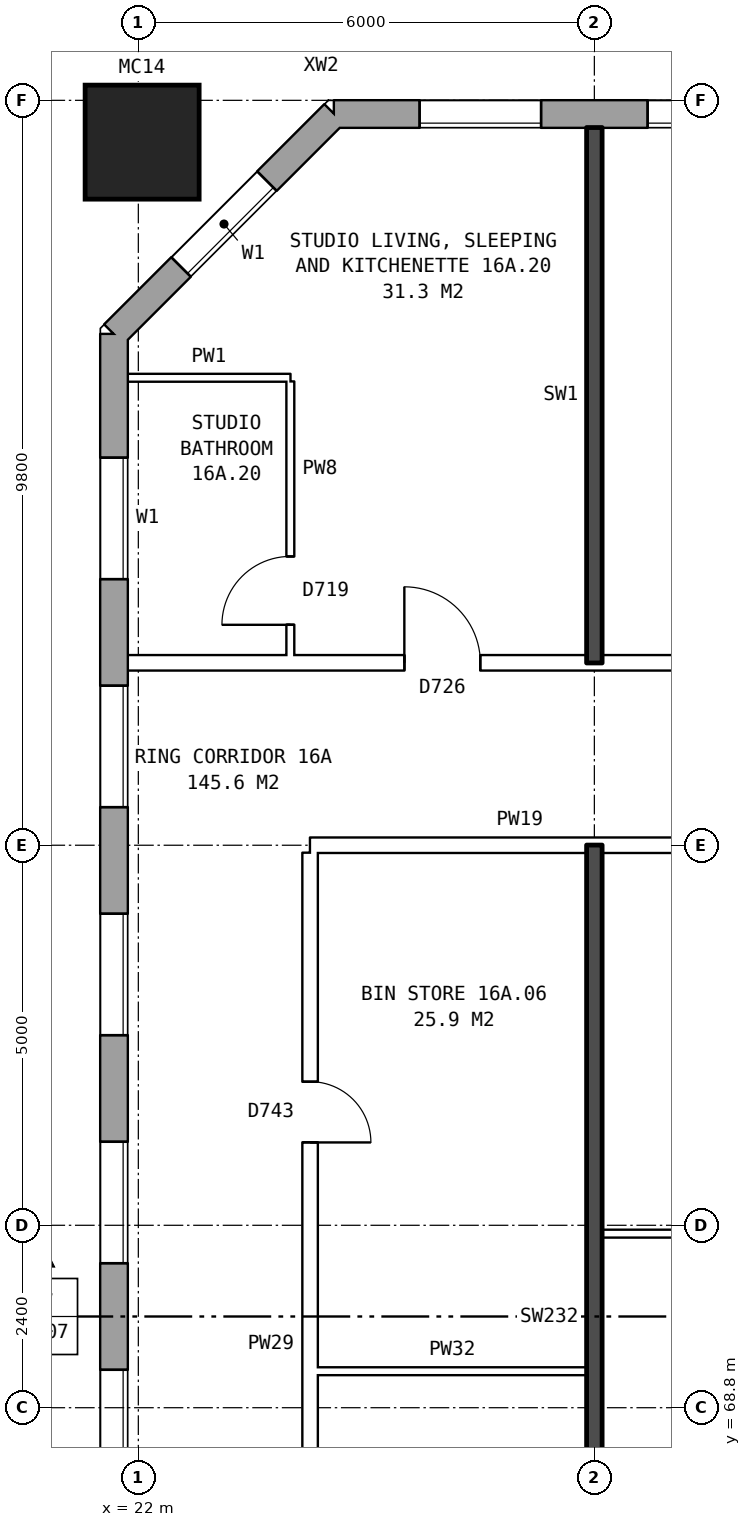
"""IFC4 building model, lengths in metres.
Left out: names, types, materials, properties, quantities, classifications, styles, units other than length and angle.
Written with IfcOpenShell. Run it as: python <this file> out.ifc"""

import sys

from ifc_helpers import new_model, si_unit, direction, frame, frame_2d, origin, origin_2d, place, context, subcontext, project, spatial, rectangle, hollow_rectangle, extrude, element, fill, save


model = new_model("IFC4")
c1 = context("Model", 3, precision=1e-05, world=origin(), true_north=direction((0.0, 1.0)))
c2 = subcontext(c1, "Body", "Model", "MODEL_VIEW")
j1 = project(units=[si_unit("LENGTHUNIT", "METRE"), si_unit("PLANEANGLEUNIT", "RADIAN")], contexts=[c1])
p1 = place(None, origin())
s1 = spatial("IfcSite", under=j1, at=p1, CompositionType="ELEMENT")
p2 = place(p1, origin())
s2 = spatial("IfcBuilding", under=s1, at=p2, CompositionType="ELEMENT")
p3 = place(p2, frame((0.0, 0.0, 59.8)))
s3 = spatial("IfcBuildingStorey", under=s2, at=p3, CompositionType="ELEMENT", Elevation=59.8)
p4 = place(p3, frame((22.05, 85.45, 0.0), z_axis=(0.0, 0.0, 1.0), x_axis=(1.0, 0.0, 0.0)))
e1 = element("IfcColumn", 1, at=p4, inside=s3, PredefinedType="COLUMN", context=c2, shape_type="SweptSolid", body=[
    extrude(hollow_rectangle(XDim=1.5, YDim=1.5, WallThickness=0.08, at=origin_2d()), origin(), (0.0, 0.0, 1.0), 3.1),
])
p5 = place(p3, frame((72.925, 85.82, 0.0), z_axis=(0.0, 0.0, 1.0), x_axis=(-1.0, 0.0, 0.0)))
e2 = element("IfcWall", 2, at=p5, inside=s3, PredefinedType="STANDARD", context=c2, shape_type="SweptSolid", body=[
    extrude(rectangle(XDim=48.351, YDim=0.36, at=frame_2d((24.175, 0.0))), origin(), (0.0, 0.0, 1.0), 2.85),
])
p6 = place(p5, frame((0.625, 0.0, 0.8)))
e3 = element("IfcOpeningElement", 3, at=p6, cuts=e2, PredefinedType="OPENING", context=c2, shape_type="SweptSolid", body=[
    extrude(rectangle(XDim=1.6, YDim=1.8, at=frame_2d((0.8, 0.9))), frame((0.0, 0.19, 0.0), z_axis=(0.0, -1.0, 0.0), x_axis=(1.0, 0.0, 0.0)), (0.0, 0.0, 1.0), 0.38),
])
p7 = place(p5, frame((3.625, 0.0, 0.8)))
e4 = element("IfcOpeningElement", 4, at=p7, cuts=e2, PredefinedType="OPENING", context=c2, shape_type="SweptSolid", body=[
    extrude(rectangle(XDim=1.6, YDim=1.8, at=frame_2d((0.8, 0.9))), frame((0.0, 0.19, 0.0), z_axis=(0.0, -1.0, 0.0), x_axis=(1.0, 0.0, 0.0)), (0.0, 0.0, 1.0), 0.38),
])
p8 = place(p5, frame((6.625, 0.0, 0.8)))
e5 = element("IfcOpeningElement", 5, at=p8, cuts=e2, PredefinedType="OPENING", context=c2, shape_type="SweptSolid", body=[
    extrude(rectangle(XDim=1.6, YDim=1.8, at=frame_2d((0.8, 0.9))), frame((0.0, 0.19, 0.0), z_axis=(0.0, -1.0, 0.0), x_axis=(1.0, 0.0, 0.0)), (0.0, 0.0, 1.0), 0.38),
])
p9 = place(p5, frame((9.625, 0.0, 0.8)))
e6 = element("IfcOpeningElement", 6, at=p9, cuts=e2, PredefinedType="OPENING", context=c2, shape_type="SweptSolid", body=[
    extrude(rectangle(XDim=1.6, YDim=1.8, at=frame_2d((0.8, 0.9))), frame((0.0, 0.19, 0.0), z_axis=(0.0, -1.0, 0.0), x_axis=(1.0, 0.0, 0.0)), (0.0, 0.0, 1.0), 0.38),
])
p10 = place(p5, frame((12.625, 0.0, 0.8)))
e7 = element("IfcOpeningElement", 7, at=p10, cuts=e2, PredefinedType="OPENING", context=c2, shape_type="SweptSolid", body=[
    extrude(rectangle(XDim=1.6, YDim=1.8, at=frame_2d((0.8, 0.9))), frame((0.0, 0.19, 0.0), z_axis=(0.0, -1.0, 0.0), x_axis=(1.0, 0.0, 0.0)), (0.0, 0.0, 1.0), 0.38),
])
p11 = place(p5, frame((15.625, 0.0, 0.8)))
e8 = element("IfcOpeningElement", 8, at=p11, cuts=e2, PredefinedType="OPENING", context=c2, shape_type="SweptSolid", body=[
    extrude(rectangle(XDim=1.6, YDim=1.8, at=frame_2d((0.8, 0.9))), frame((0.0, 0.19, 0.0), z_axis=(0.0, -1.0, 0.0), x_axis=(1.0, 0.0, 0.0)), (0.0, 0.0, 1.0), 0.38),
])
p12 = place(p5, frame((18.625, 0.0, 0.8)))
e9 = element("IfcOpeningElement", 9, at=p12, cuts=e2, PredefinedType="OPENING", context=c2, shape_type="SweptSolid", body=[
    extrude(rectangle(XDim=1.6, YDim=1.8, at=frame_2d((0.8, 0.9))), frame((0.0, 0.19, 0.0), z_axis=(0.0, -1.0, 0.0), x_axis=(1.0, 0.0, 0.0)), (0.0, 0.0, 1.0), 0.38),
])
p13 = place(p5, frame((21.125, 0.0, 1.65)))
e10 = element("IfcOpeningElement", 10, at=p13, cuts=e2, PredefinedType="OPENING", context=c2, shape_type="SweptSolid", body=[
    extrude(rectangle(XDim=0.8, YDim=0.9, at=frame_2d((0.4, 0.45))), frame((0.0, 0.19, 0.0), z_axis=(0.0, -1.0, 0.0), x_axis=(1.0, 0.0, 0.0)), (0.0, 0.0, 1.0), 0.38),
])
p14 = place(p5, frame((24.075, 0.0, 0.25)))
e11 = element("IfcOpeningElement", 11, at=p14, cuts=e2, PredefinedType="OPENING", context=c2, shape_type="SweptSolid", body=[
    extrude(rectangle(XDim=0.8, YDim=1.5, at=frame_2d((0.4, 0.75))), frame((0.0, 0.19, 0.0), z_axis=(0.0, -1.0, 0.0), x_axis=(1.0, 0.0, 0.0)), (0.0, 0.0, 1.0), 0.38),
])
p15 = place(p5, frame((27.625, 0.0, 0.8)))
e12 = element("IfcOpeningElement", 12, at=p15, cuts=e2, PredefinedType="OPENING", context=c2, shape_type="SweptSolid", body=[
    extrude(rectangle(XDim=1.6, YDim=1.8, at=frame_2d((0.8, 0.9))), frame((0.0, 0.19, 0.0), z_axis=(0.0, -1.0, 0.0), x_axis=(1.0, 0.0, 0.0)), (0.0, 0.0, 1.0), 0.38),
])
p16 = place(p5, frame((30.625, 0.0, 0.8)))
e13 = element("IfcOpeningElement", 13, at=p16, cuts=e2, PredefinedType="OPENING", context=c2, shape_type="SweptSolid", body=[
    extrude(rectangle(XDim=1.6, YDim=1.8, at=frame_2d((0.8, 0.9))), frame((0.0, 0.19, 0.0), z_axis=(0.0, -1.0, 0.0), x_axis=(1.0, 0.0, 0.0)), (0.0, 0.0, 1.0), 0.38),
])
p17 = place(p5, frame((33.625, 0.0, 0.8)))
e14 = element("IfcOpeningElement", 14, at=p17, cuts=e2, PredefinedType="OPENING", context=c2, shape_type="SweptSolid", body=[
    extrude(rectangle(XDim=1.6, YDim=1.8, at=frame_2d((0.8, 0.9))), frame((0.0, 0.19, 0.0), z_axis=(0.0, -1.0, 0.0), x_axis=(1.0, 0.0, 0.0)), (0.0, 0.0, 1.0), 0.38),
])
p18 = place(p5, frame((36.625, 0.0, 0.8)))
e15 = element("IfcOpeningElement", 15, at=p18, cuts=e2, PredefinedType="OPENING", context=c2, shape_type="SweptSolid", body=[
    extrude(rectangle(XDim=1.6, YDim=1.8, at=frame_2d((0.8, 0.9))), frame((0.0, 0.19, 0.0), z_axis=(0.0, -1.0, 0.0), x_axis=(1.0, 0.0, 0.0)), (0.0, 0.0, 1.0), 0.38),
])
p19 = place(p5, frame((39.625, 0.0, 0.8)))
e16 = element("IfcOpeningElement", 16, at=p19, cuts=e2, PredefinedType="OPENING", context=c2, shape_type="SweptSolid", body=[
    extrude(rectangle(XDim=1.6, YDim=1.8, at=frame_2d((0.8, 0.9))), frame((0.0, 0.19, 0.0), z_axis=(0.0, -1.0, 0.0), x_axis=(1.0, 0.0, 0.0)), (0.0, 0.0, 1.0), 0.38),
])
p20 = place(p5, frame((42.625, 0.0, 0.8)))
e17 = element("IfcOpeningElement", 17, at=p20, cuts=e2, PredefinedType="OPENING", context=c2, shape_type="SweptSolid", body=[
    extrude(rectangle(XDim=1.6, YDim=1.8, at=frame_2d((0.8, 0.9))), frame((0.0, 0.19, 0.0), z_axis=(0.0, -1.0, 0.0), x_axis=(1.0, 0.0, 0.0)), (0.0, 0.0, 1.0), 0.38),
])
p21 = place(p5, frame((45.625, 0.0, 0.8)))
e18 = element("IfcOpeningElement", 18, at=p21, cuts=e2, PredefinedType="OPENING", context=c2, shape_type="SweptSolid", body=[
    extrude(rectangle(XDim=1.6, YDim=1.8, at=frame_2d((0.8, 0.9))), frame((0.0, 0.19, 0.0), z_axis=(0.0, -1.0, 0.0), x_axis=(1.0, 0.0, 0.0)), (0.0, 0.0, 1.0), 0.38),
])
p22 = place(p5, frame((22.425, 0.0, 0.15)))
e19 = element("IfcOpeningElement", 19, at=p22, cuts=e2, PredefinedType="OPENING", context=c2, shape_type="SweptSolid", body=[
    extrude(rectangle(XDim=1.2, YDim=0.9, at=frame_2d((0.6, 0.45))), frame((0.0, 0.19, 0.0), z_axis=(0.0, -1.0, 0.0), x_axis=(1.0, 0.0, 0.0)), (0.0, 0.0, 1.0), 0.38),
])
p23 = place(p5, frame((25.175, 0.0, 0.25)))
e20 = element("IfcOpeningElement", 20, at=p23, cuts=e2, PredefinedType="OPENING", context=c2, shape_type="SweptSolid", body=[
    extrude(rectangle(XDim=0.6, YDim=0.9, at=frame_2d((0.3, 0.45))), frame((0.0, 0.19, 0.0), z_axis=(0.0, -1.0, 0.0), x_axis=(1.0, 0.0, 0.0)), (0.0, 0.0, 1.0), 0.38),
])
p24 = place(p3, frame((24.575, 85.82, 0.0), z_axis=(0.0, 0.0, 1.0), x_axis=(-0.707106781187, -0.707106781187, 0.0)))
e21 = element("IfcWall", 21, at=p24, inside=s3, PredefinedType="STANDARD", context=c2, shape_type="SweptSolid", body=[
    extrude(rectangle(XDim=4.094, YDim=0.36, at=frame_2d((2.047, 0.0))), origin(), (0.0, 0.0, 1.0), 2.85),
])
p25 = place(p24, frame((1.247, 0.0, 0.8)))
e22 = element("IfcOpeningElement", 22, at=p25, cuts=e21, PredefinedType="OPENING", context=c2, shape_type="SweptSolid", body=[
    extrude(rectangle(XDim=1.6, YDim=1.8, at=frame_2d((0.8, 0.9))), frame((0.0, 0.19, 0.0), z_axis=(0.0, -1.0, 0.0), x_axis=(1.0, 0.0, 0.0)), (0.0, 0.0, 1.0), 0.38),
])
p26 = place(p3, frame((21.68, 82.925, 0.0), z_axis=(0.0, 0.0, 1.0), x_axis=(0.0, -1.0, 0.0)))
e23 = element("IfcWall", 23, at=p26, inside=s3, PredefinedType="STANDARD", context=c2, shape_type="SweptSolid", body=[
    extrude(rectangle(XDim=25.851, YDim=0.36, at=frame_2d((12.925, 0.0))), origin(), (0.0, 0.0, 1.0), 2.85),
])
p27 = place(p26, frame((1.625, 0.0, 0.8)))
e24 = element("IfcOpeningElement", 24, at=p27, cuts=e23, PredefinedType="OPENING", context=c2, shape_type="SweptSolid", body=[
    extrude(rectangle(XDim=1.6, YDim=1.8, at=frame_2d((0.8, 0.9))), frame((0.0, 0.19, 0.0), z_axis=(0.0, -1.0, 0.0), x_axis=(1.0, 0.0, 0.0)), (0.0, 0.0, 1.0), 0.38),
])
p28 = place(p26, frame((4.625, 0.0, 0.8)))
e25 = element("IfcOpeningElement", 25, at=p28, cuts=e23, PredefinedType="OPENING", context=c2, shape_type="SweptSolid", body=[
    extrude(rectangle(XDim=1.6, YDim=1.8, at=frame_2d((0.8, 0.9))), frame((0.0, 0.19, 0.0), z_axis=(0.0, -1.0, 0.0), x_axis=(1.0, 0.0, 0.0)), (0.0, 0.0, 1.0), 0.38),
])
p29 = place(p26, frame((7.625, 0.0, 0.8)))
e26 = element("IfcOpeningElement", 26, at=p29, cuts=e23, PredefinedType="OPENING", context=c2, shape_type="SweptSolid", body=[
    extrude(rectangle(XDim=1.6, YDim=1.8, at=frame_2d((0.8, 0.9))), frame((0.0, 0.19, 0.0), z_axis=(0.0, -1.0, 0.0), x_axis=(1.0, 0.0, 0.0)), (0.0, 0.0, 1.0), 0.38),
])
p30 = place(p26, frame((10.625, 0.0, 0.8)))
e27 = element("IfcOpeningElement", 27, at=p30, cuts=e23, PredefinedType="OPENING", context=c2, shape_type="SweptSolid", body=[
    extrude(rectangle(XDim=1.6, YDim=1.8, at=frame_2d((0.8, 0.9))), frame((0.0, 0.19, 0.0), z_axis=(0.0, -1.0, 0.0), x_axis=(1.0, 0.0, 0.0)), (0.0, 0.0, 1.0), 0.38),
])
p31 = place(p26, frame((13.625, 0.0, 0.8)))
e28 = element("IfcOpeningElement", 28, at=p31, cuts=e23, PredefinedType="OPENING", context=c2, shape_type="SweptSolid", body=[
    extrude(rectangle(XDim=1.6, YDim=1.8, at=frame_2d((0.8, 0.9))), frame((0.0, 0.19, 0.0), z_axis=(0.0, -1.0, 0.0), x_axis=(1.0, 0.0, 0.0)), (0.0, 0.0, 1.0), 0.38),
])
p32 = place(p26, frame((16.625, 0.0, 0.8)))
e29 = element("IfcOpeningElement", 29, at=p32, cuts=e23, PredefinedType="OPENING", context=c2, shape_type="SweptSolid", body=[
    extrude(rectangle(XDim=1.6, YDim=1.8, at=frame_2d((0.8, 0.9))), frame((0.0, 0.19, 0.0), z_axis=(0.0, -1.0, 0.0), x_axis=(1.0, 0.0, 0.0)), (0.0, 0.0, 1.0), 0.38),
])
p33 = place(p26, frame((19.625, 0.0, 0.8)))
e30 = element("IfcOpeningElement", 30, at=p33, cuts=e23, PredefinedType="OPENING", context=c2, shape_type="SweptSolid", body=[
    extrude(rectangle(XDim=1.6, YDim=1.8, at=frame_2d((0.8, 0.9))), frame((0.0, 0.19, 0.0), z_axis=(0.0, -1.0, 0.0), x_axis=(1.0, 0.0, 0.0)), (0.0, 0.0, 1.0), 0.38),
])
p34 = place(p26, frame((22.625, 0.0, 0.8)))
e31 = element("IfcOpeningElement", 31, at=p34, cuts=e23, PredefinedType="OPENING", context=c2, shape_type="SweptSolid", body=[
    extrude(rectangle(XDim=1.6, YDim=1.8, at=frame_2d((0.8, 0.9))), frame((0.0, 0.19, 0.0), z_axis=(0.0, -1.0, 0.0), x_axis=(1.0, 0.0, 0.0)), (0.0, 0.0, 1.0), 0.38),
])
p35 = place(p3, frame((24.36, 69.28, 0.0), z_axis=(0.0, 0.0, 1.0), x_axis=(1.0, 0.0, 0.0)))
e32 = element("IfcWall", 32, at=p35, inside=s3, PredefinedType="PARTITIONING", context=c2, shape_type="SweptSolid", body=[
    extrude(rectangle(XDim=3.54, YDim=0.1, at=frame_2d((1.77, 0.0))), origin(), (0.0, 0.0, 1.0), 2.85),
])
p36 = place(p3, frame((28.1, 71.09, 0.0), z_axis=(0.0, 0.0, 1.0), x_axis=(1.0, 0.0, 0.0)))
e33 = element("IfcWall", 33, at=p36, inside=s3, PredefinedType="PARTITIONING", context=c2, shape_type="SweptSolid", body=[
    extrude(rectangle(XDim=4.26, YDim=0.1, at=frame_2d((2.13, 0.0))), origin(), (0.0, 0.0, 1.0), 2.85),
])
p37 = place(p3, frame((24.26, 76.2, 0.0), z_axis=(0.0, 0.0, 1.0), x_axis=(1.0, 0.0, 0.0)))
e34 = element("IfcWall", 34, at=p37, inside=s3, PredefinedType="PARTITIONING", context=c2, shape_type="SweptSolid", body=[
    extrude(rectangle(XDim=8.1, YDim=0.2, at=frame_2d((4.05, 0.0))), origin(), (0.0, 0.0, 1.0), 2.85),
])
p38 = place(p37, frame((5.52, 0.0, 0.0)))
e35 = element("IfcOpeningElement", 35, at=p38, cuts=e34, PredefinedType="OPENING", context=c2, shape_type="SweptSolid", body=[
    extrude(rectangle(XDim=0.8, YDim=2.1, at=frame_2d((0.4, 1.05))), frame((0.0, 0.11, 0.0), z_axis=(0.0, -1.0, 0.0), x_axis=(1.0, 0.0, 0.0)), (0.0, 0.0, 1.0), 0.22),
])
p39 = place(p3, frame((21.86, 78.6, 0.0), z_axis=(0.0, 0.0, 1.0), x_axis=(1.0, 0.0, 0.0)))
e36 = element("IfcWall", 36, at=p39, inside=s3, PredefinedType="PARTITIONING", context=c2, shape_type="SweptSolid", body=[
    extrude(rectangle(XDim=24.04, YDim=0.2, at=frame_2d((12.02, 0.0))), origin(), (0.0, 0.0, 1.0), 2.85),
])
p40 = place(p39, frame((20.59, 0.0, 0.0)))
e37 = element("IfcOpeningElement", 37, at=p40, cuts=e36, PredefinedType="OPENING", context=c2, shape_type="SweptSolid", body=[
    extrude(rectangle(XDim=1.0, YDim=2.1, at=frame_2d((0.5, 1.05))), frame((0.0, 0.11, 0.0), z_axis=(0.0, -1.0, 0.0), x_axis=(1.0, 0.0, 0.0)), (0.0, 0.0, 1.0), 0.22),
])
p41 = place(p39, frame((8.64, 0.0, 0.0)))
e38 = element("IfcOpeningElement", 38, at=p41, cuts=e36, PredefinedType="OPENING", context=c2, shape_type="SweptSolid", body=[
    extrude(rectangle(XDim=1.0, YDim=2.1, at=frame_2d((0.5, 1.05))), frame((0.0, 0.11, 0.0), z_axis=(0.0, -1.0, 0.0), x_axis=(1.0, 0.0, 0.0)), (0.0, 0.0, 1.0), 0.22),
])
p42 = place(p39, frame((3.64, 0.0, 0.0)))
e39 = element("IfcOpeningElement", 39, at=p42, cuts=e36, PredefinedType="OPENING", context=c2, shape_type="SweptSolid", body=[
    extrude(rectangle(XDim=1.0, YDim=2.1, at=frame_2d((0.5, 1.05))), frame((0.0, 0.11, 0.0), z_axis=(0.0, -1.0, 0.0), x_axis=(1.0, 0.0, 0.0)), (0.0, 0.0, 1.0), 0.22),
])
p43 = place(p3, frame((21.86, 82.35, 0.0), z_axis=(0.0, 0.0, 1.0), x_axis=(1.0, 0.0, 0.0)))
e40 = element("IfcWall", 40, at=p43, inside=s3, PredefinedType="PARTITIONING", context=c2, shape_type="SweptSolid", body=[
    extrude(rectangle(XDim=2.14, YDim=0.1, at=frame_2d((1.07, 0.0))), origin(), (0.0, 0.0, 1.0), 2.85),
])
p44 = place(p3, frame((24.0, 78.7, 0.0), z_axis=(0.0, 0.0, 1.0), x_axis=(0.0, 1.0, 0.0)))
e41 = element("IfcWall", 41, at=p44, inside=s3, PredefinedType="PARTITIONING", context=c2, shape_type="SweptSolid", body=[
    extrude(rectangle(XDim=3.6, YDim=0.1, at=frame_2d((1.8, 0.0))), origin(), (0.0, 0.0, 1.0), 2.85),
])
p45 = place(p44, frame((0.4, 0.0, 0.0)))
e42 = element("IfcOpeningElement", 42, at=p45, cuts=e41, PredefinedType="OPENING", context=c2, shape_type="SweptSolid", body=[
    extrude(rectangle(XDim=0.9, YDim=2.1, at=frame_2d((0.45, 1.05))), frame((0.0, 0.06, 0.0), z_axis=(0.0, -1.0, 0.0), x_axis=(1.0, 0.0, 0.0)), (0.0, 0.0, 1.0), 0.12),
])
p46 = place(p3, frame((24.26, 63.9, 0.0), z_axis=(0.0, 0.0, 1.0), x_axis=(0.0, 1.0, 0.0)))
e43 = element("IfcWall", 43, at=p46, inside=s3, PredefinedType="PARTITIONING", context=c2, shape_type="SweptSolid", body=[
    extrude(rectangle(XDim=12.2, YDim=0.2, at=frame_2d((6.1, 0.0))), origin(), (0.0, 0.0, 1.0), 2.85),
])
p47 = place(p46, frame((2.29, 0.0, 0.0)))
e44 = element("IfcOpeningElement", 44, at=p47, cuts=e43, PredefinedType="OPENING", context=c2, shape_type="SweptSolid", body=[
    extrude(rectangle(XDim=0.8, YDim=2.1, at=frame_2d((0.4, 1.05))), frame((0.0, 0.11, 0.0), z_axis=(0.0, -1.0, 0.0), x_axis=(1.0, 0.0, 0.0)), (0.0, 0.0, 1.0), 0.22),
])
p48 = place(p46, frame((8.39, 0.0, 0.0)))
e45 = element("IfcOpeningElement", 45, at=p48, cuts=e43, PredefinedType="OPENING", context=c2, shape_type="SweptSolid", body=[
    extrude(rectangle(XDim=0.8, YDim=2.1, at=frame_2d((0.4, 1.05))), frame((0.0, 0.11, 0.0), z_axis=(0.0, -1.0, 0.0), x_axis=(1.0, 0.0, 0.0)), (0.0, 0.0, 1.0), 0.22),
])
p49 = place(p3, frame((28.0, 63.8, 0.0), z_axis=(0.0, 0.0, 1.0), x_axis=(0.0, 1.0, 0.0)))
e46 = element("IfcWall", 46, at=p49, inside=s3, PredefinedType="SOLIDWALL", context=c2, shape_type="SweptSolid", body=[
    extrude(rectangle(XDim=12.4, YDim=0.2, at=frame_2d((6.2, 0.0))), origin(), (0.0, 0.0, 1.0), 2.85),
])
p50 = place(p3, frame((28.0, 78.6, 0.0), z_axis=(0.0, 0.0, 1.0), x_axis=(0.0, 1.0, 0.0)))
e47 = element("IfcWall", 47, at=p50, inside=s3, PredefinedType="SOLIDWALL", context=c2, shape_type="SweptSolid", body=[
    extrude(rectangle(XDim=7.04, YDim=0.2, at=frame_2d((3.52, 0.0))), origin(), (0.0, 0.0, 1.0), 2.85),
])
p51 = place(p20, origin())
e48 = element("IfcWindow", 48, at=p51, inside=s3, PartitioningType="SINGLE_PANEL", PredefinedType="WINDOW", context=c2, shape_type="SweptSolid", body=[
    extrude(rectangle(XDim=1.6, YDim=1.8, at=frame_2d((0.8, 0.9))), frame((0.0, 0.15, 0.0), z_axis=(0.0, -1.0, 0.0), x_axis=(1.0, 0.0, 0.0)), (0.0, 0.0, 1.0), 0.06),
])
fill(e17, e48)
p52 = place(p21, origin())
e49 = element("IfcWindow", 49, at=p52, inside=s3, PartitioningType="SINGLE_PANEL", PredefinedType="WINDOW", context=c2, shape_type="SweptSolid", body=[
    extrude(rectangle(XDim=1.6, YDim=1.8, at=frame_2d((0.8, 0.9))), frame((0.0, 0.15, 0.0), z_axis=(0.0, -1.0, 0.0), x_axis=(1.0, 0.0, 0.0)), (0.0, 0.0, 1.0), 0.06),
])
fill(e18, e49)
p53 = place(p25, origin())
e50 = element("IfcWindow", 50, at=p53, inside=s3, PartitioningType="SINGLE_PANEL", PredefinedType="WINDOW", context=c2, shape_type="SweptSolid", body=[
    extrude(rectangle(XDim=1.6, YDim=1.8, at=frame_2d((0.8, 0.9))), frame((0.0, 0.15, 0.0), z_axis=(0.0, -1.0, 0.0), x_axis=(1.0, 0.0, 0.0)), (0.0, 0.0, 1.0), 0.06),
])
fill(e22, e50)
p54 = place(p27, origin())
e51 = element("IfcWindow", 51, at=p54, inside=s3, PartitioningType="SINGLE_PANEL", PredefinedType="WINDOW", context=c2, shape_type="SweptSolid", body=[
    extrude(rectangle(XDim=1.6, YDim=1.8, at=frame_2d((0.8, 0.9))), frame((0.0, 0.15, 0.0), z_axis=(0.0, -1.0, 0.0), x_axis=(1.0, 0.0, 0.0)), (0.0, 0.0, 1.0), 0.06),
])
fill(e24, e51)
p55 = place(p28, origin())
e52 = element("IfcWindow", 52, at=p55, inside=s3, PartitioningType="SINGLE_PANEL", PredefinedType="WINDOW", context=c2, shape_type="SweptSolid", body=[
    extrude(rectangle(XDim=1.6, YDim=1.8, at=frame_2d((0.8, 0.9))), frame((0.0, 0.15, 0.0), z_axis=(0.0, -1.0, 0.0), x_axis=(1.0, 0.0, 0.0)), (0.0, 0.0, 1.0), 0.06),
])
fill(e25, e52)
p56 = place(p29, origin())
e53 = element("IfcWindow", 53, at=p56, inside=s3, PartitioningType="SINGLE_PANEL", PredefinedType="WINDOW", context=c2, shape_type="SweptSolid", body=[
    extrude(rectangle(XDim=1.6, YDim=1.8, at=frame_2d((0.8, 0.9))), frame((0.0, 0.15, 0.0), z_axis=(0.0, -1.0, 0.0), x_axis=(1.0, 0.0, 0.0)), (0.0, 0.0, 1.0), 0.06),
])
fill(e26, e53)
p57 = place(p30, origin())
e54 = element("IfcWindow", 54, at=p57, inside=s3, PartitioningType="SINGLE_PANEL", PredefinedType="WINDOW", context=c2, shape_type="SweptSolid", body=[
    extrude(rectangle(XDim=1.6, YDim=1.8, at=frame_2d((0.8, 0.9))), frame((0.0, 0.15, 0.0), z_axis=(0.0, -1.0, 0.0), x_axis=(1.0, 0.0, 0.0)), (0.0, 0.0, 1.0), 0.06),
])
fill(e27, e54)
p58 = place(p31, origin())
e55 = element("IfcWindow", 55, at=p58, inside=s3, PartitioningType="SINGLE_PANEL", PredefinedType="WINDOW", context=c2, shape_type="SweptSolid", body=[
    extrude(rectangle(XDim=1.6, YDim=1.8, at=frame_2d((0.8, 0.9))), frame((0.0, 0.15, 0.0), z_axis=(0.0, -1.0, 0.0), x_axis=(1.0, 0.0, 0.0)), (0.0, 0.0, 1.0), 0.06),
])
fill(e28, e55)
p59 = place(p48, frame((0.8, 0.0, 0.0), z_axis=(0.0, 0.0, 1.0), x_axis=(-1.0, 0.0, 0.0)))
e56 = element("IfcDoor", 56, at=p59, inside=s3, OperationType="SINGLE_SWING_RIGHT", PredefinedType="DOOR", context=c2, shape_type="SweptSolid", body=[
    extrude(rectangle(XDim=0.8, YDim=2.1, at=frame_2d((0.4, 1.05))), frame((0.0, 0.025, 0.0), z_axis=(0.0, -1.0, 0.0), x_axis=(1.0, 0.0, 0.0)), (0.0, 0.0, 1.0), 0.05),
])
fill(e45, e56)
p60 = place(p42, origin())
e57 = element("IfcDoor", 57, at=p60, inside=s3, OperationType="SINGLE_SWING_LEFT", PredefinedType="DOOR", context=c2, shape_type="SweptSolid", body=[
    extrude(rectangle(XDim=1.0, YDim=2.1, at=frame_2d((0.5, 1.05))), frame((0.0, 0.025, 0.0), z_axis=(0.0, -1.0, 0.0), x_axis=(1.0, 0.0, 0.0)), (0.0, 0.0, 1.0), 0.05),
])
fill(e39, e57)
p61 = place(p45, origin())
e58 = element("IfcDoor", 58, at=p61, inside=s3, OperationType="SINGLE_SWING_LEFT", PredefinedType="DOOR", context=c2, shape_type="SweptSolid", body=[
    extrude(rectangle(XDim=0.9, YDim=2.1, at=frame_2d((0.45, 1.05))), frame((0.0, 0.025, 0.0), z_axis=(0.0, -1.0, 0.0), x_axis=(1.0, 0.0, 0.0)), (0.0, 0.0, 1.0), 0.05),
])
fill(e42, e58)
save(model, sys.argv[1])
